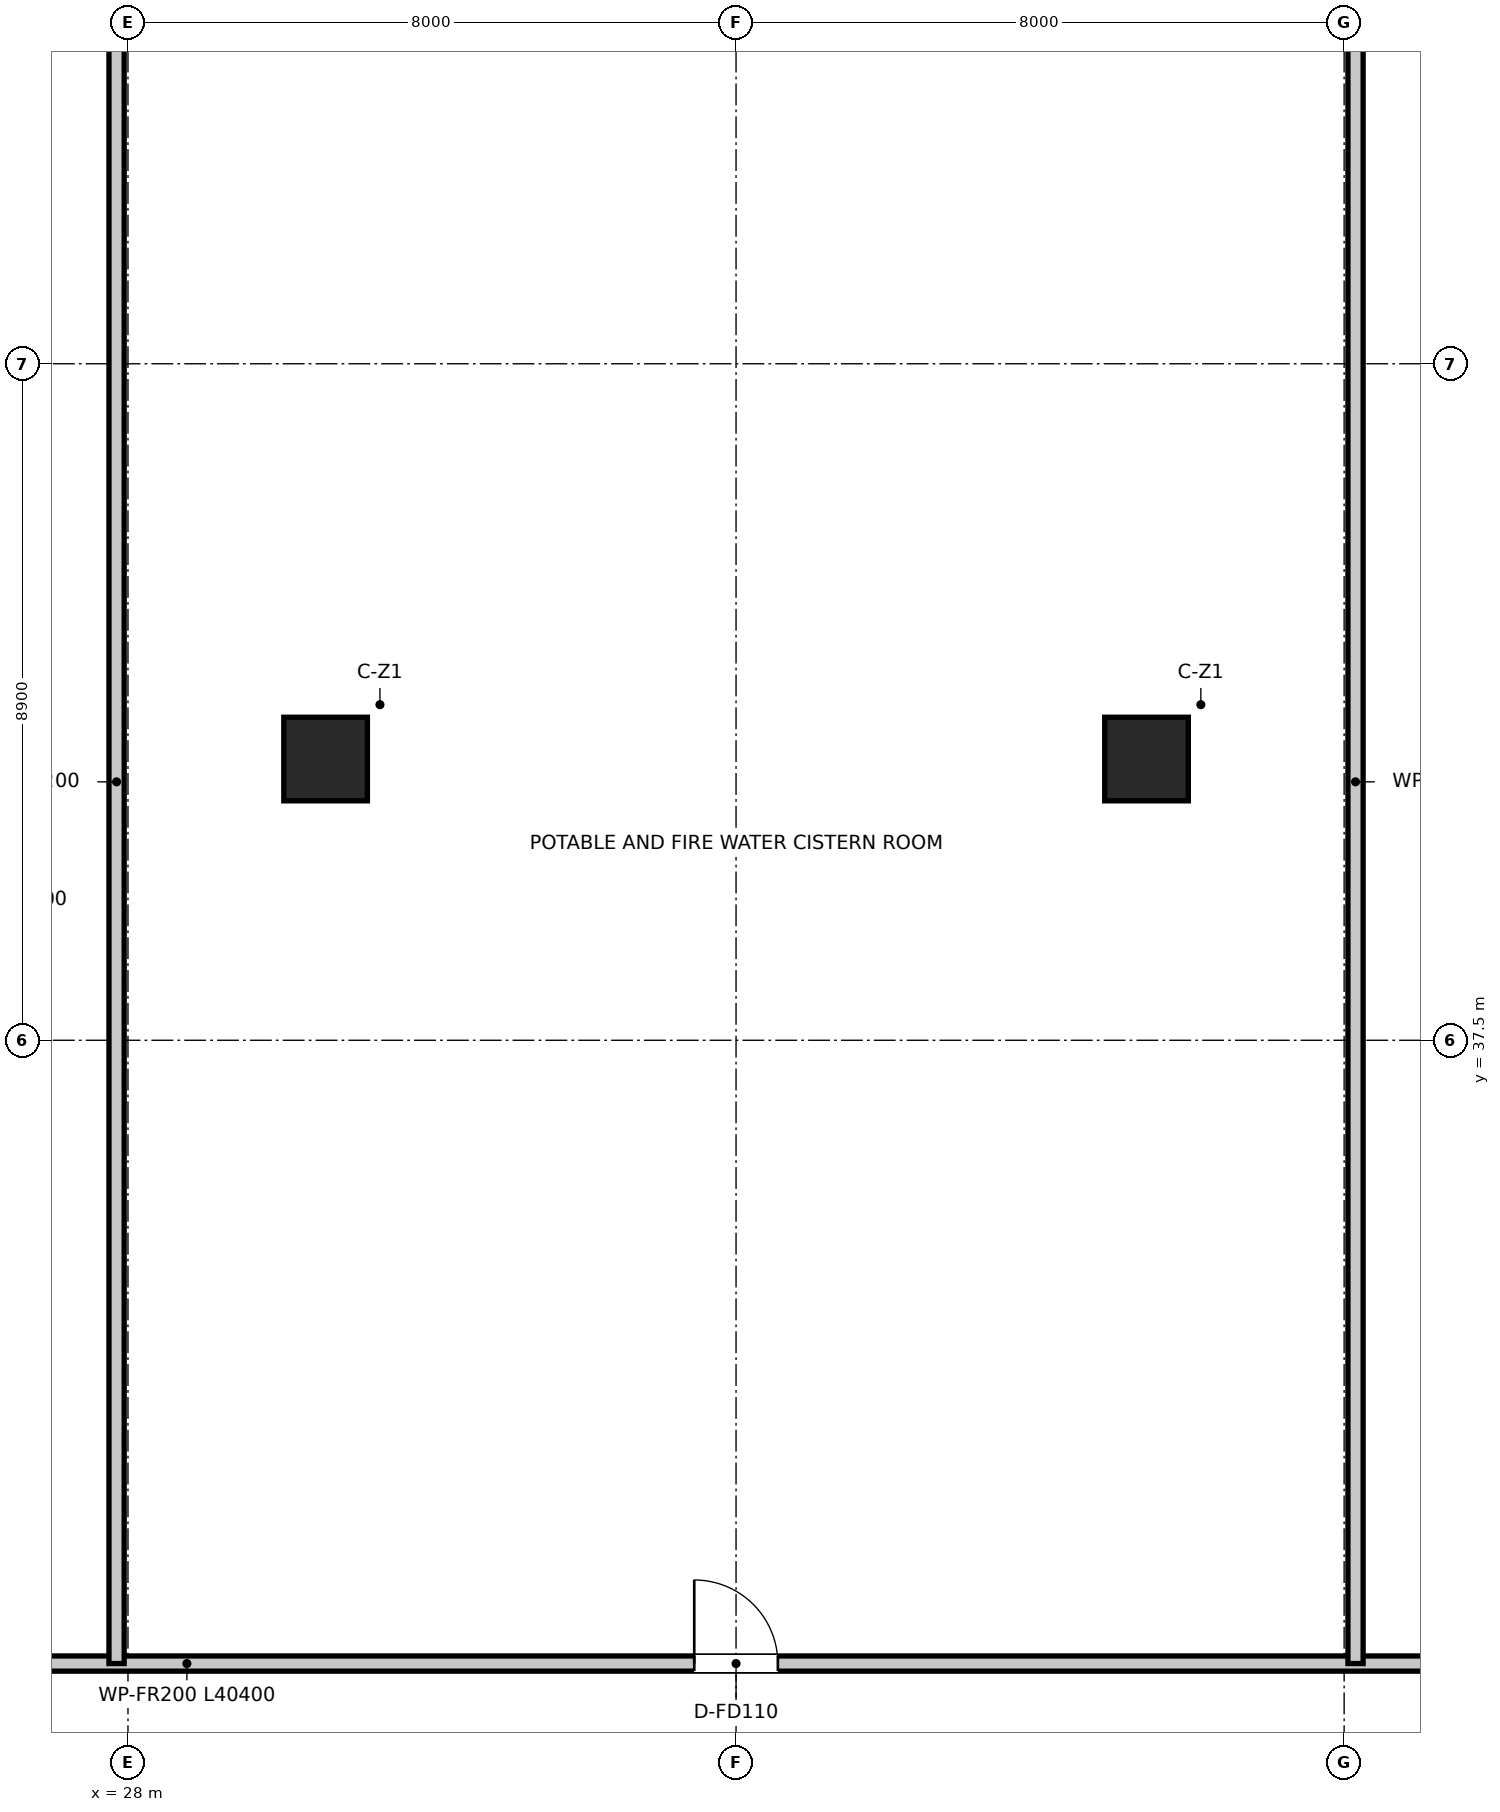
"""IFC4 building model, lengths in metres.
Left out: names, types, materials, properties, quantities, classifications, styles, units other than length and angle.
Written with IfcOpenShell. Run it as: python <this file> out.ifc"""

import sys

from ifc_helpers import new_model, si_unit, direction, frame, frame_2d, origin, origin_2d, place, context, subcontext, project, spatial, rectangle, extrude, source, transform, mapped, element, fill, save


model = new_model("IFC4")
c1 = context("Model", 3, precision=1e-05, world=origin(), true_north=direction((0.0, 1.0)))
c2 = subcontext(c1, "Body", "Model", "MODEL_VIEW")
j1 = project(units=[si_unit("LENGTHUNIT", "METRE"), si_unit("PLANEANGLEUNIT", "RADIAN")], contexts=[c1])
p1 = place(None, origin())
s1 = spatial("IfcSite", under=j1, at=p1, CompositionType="ELEMENT")
p2 = place(p1, origin())
s2 = spatial("IfcBuilding", under=s1, at=p2, CompositionType="ELEMENT")
p3 = place(p2, frame((0.0, 0.0, -4.8)))
s3 = spatial("IfcBuildingStorey", under=s2, at=p3, CompositionType="ELEMENT", Elevation=-4.8)
m1 = source(origin(), c2, "Body", "SweptSolid", [
    extrude(rectangle(XDim=1.1, YDim=1.1, at=origin_2d()), origin(), (0.0, 0.0, 1.0), 4.8),
])
for number, where, z_axis, x_axis in (
    (1, (30.6, 41.2, 0.0), (0.0, 0.0, 1.0), (1.0, 0.0, 0.0)),
    (2, (41.4, 41.2, 0.0), (0.0, 0.0, 1.0), (1.0, 0.0, 0.0)),
):
    element("IfcColumn", number, at=place(p3, frame(where, z_axis=z_axis, x_axis=x_axis)), inside=s3, PredefinedType="COLUMN", context=c2, shape_type="MappedRepresentation", body=[
        mapped(m1, transform((0.0, 0.0, 0.0), x_axis=(1.0, 0.0, 0.0), y_axis=(0.0, 1.0, 0.0), z_axis=(0.0, 0.0, 1.0), scale=1.0)),
    ])
p4 = place(p3, frame((15.8, 29.3, 0.0), z_axis=(0.0, 0.0, 1.0), x_axis=(1.0, 0.0, 0.0)))
e3 = element("IfcWall", 3, at=p4, inside=s3, PredefinedType="PARTITIONING", context=c2, shape_type="SweptSolid", body=[
    extrude(rectangle(XDim=40.4, YDim=0.2, at=frame_2d((20.2, 0.0))), origin(), (0.0, 0.0, 1.0), 3.65),
])
p5 = place(p4, frame((5.1, 0.0, 0.0)))
e4 = element("IfcOpeningElement", 4, at=p5, cuts=e3, PredefinedType="OPENING", context=c2, shape_type="SweptSolid", body=[
    extrude(rectangle(XDim=1.2, YDim=2.15, at=frame_2d((0.6, 1.075))), frame((0.0, 0.11, 0.0), z_axis=(0.0, -1.0, 0.0), x_axis=(1.0, 0.0, 0.0)), (0.0, 0.0, 1.0), 0.22),
])
p6 = place(p4, frame((19.65, 0.0, 0.0)))
e5 = element("IfcOpeningElement", 5, at=p6, cuts=e3, PredefinedType="OPENING", context=c2, shape_type="SweptSolid", body=[
    extrude(rectangle(XDim=1.1, YDim=2.15, at=frame_2d((0.55, 1.075))), frame((0.0, 0.11, 0.0), z_axis=(0.0, -1.0, 0.0), x_axis=(1.0, 0.0, 0.0)), (0.0, 0.0, 1.0), 0.22),
])
p7 = place(p4, frame((33.6, 0.0, 0.0)))
e6 = element("IfcOpeningElement", 6, at=p7, cuts=e3, PredefinedType="OPENING", context=c2, shape_type="SweptSolid", body=[
    extrude(rectangle(XDim=1.2, YDim=2.15, at=frame_2d((0.6, 1.075))), frame((0.0, 0.11, 0.0), z_axis=(0.0, -1.0, 0.0), x_axis=(1.0, 0.0, 0.0)), (0.0, 0.0, 1.0), 0.22),
])
for number, where, z_axis, x_axis in (
    (7, (27.85, 29.3, 0.0), (0.0, 0.0, 1.0), (0.0, 1.0, 0.0)),
    (8, (44.15, 29.3, 0.0), (0.0, 0.0, 1.0), (0.0, 1.0, 0.0)),
):
    element("IfcWall", number, at=place(p3, frame(where, z_axis=z_axis, x_axis=x_axis)), inside=s3, PredefinedType="PARTITIONING", context=c2, shape_type="SweptSolid", body=[
        extrude(rectangle(XDim=23.2, YDim=0.2, at=frame_2d((11.6, 0.0))), origin(), (0.0, 0.0, 1.0), 3.65),
    ])
p8 = place(p6, origin())
e9 = element("IfcDoor", 9, at=p8, inside=s3, OperationType="SINGLE_SWING_LEFT", PredefinedType="DOOR", context=c2, shape_type="SweptSolid", body=[
    extrude(rectangle(XDim=1.1, YDim=2.15, at=frame_2d((0.55, 1.075))), frame((0.0, 0.025, 0.0), z_axis=(0.0, -1.0, 0.0), x_axis=(1.0, 0.0, 0.0)), (0.0, 0.0, 1.0), 0.05),
])
fill(e5, e9)
save(model, sys.argv[1])
